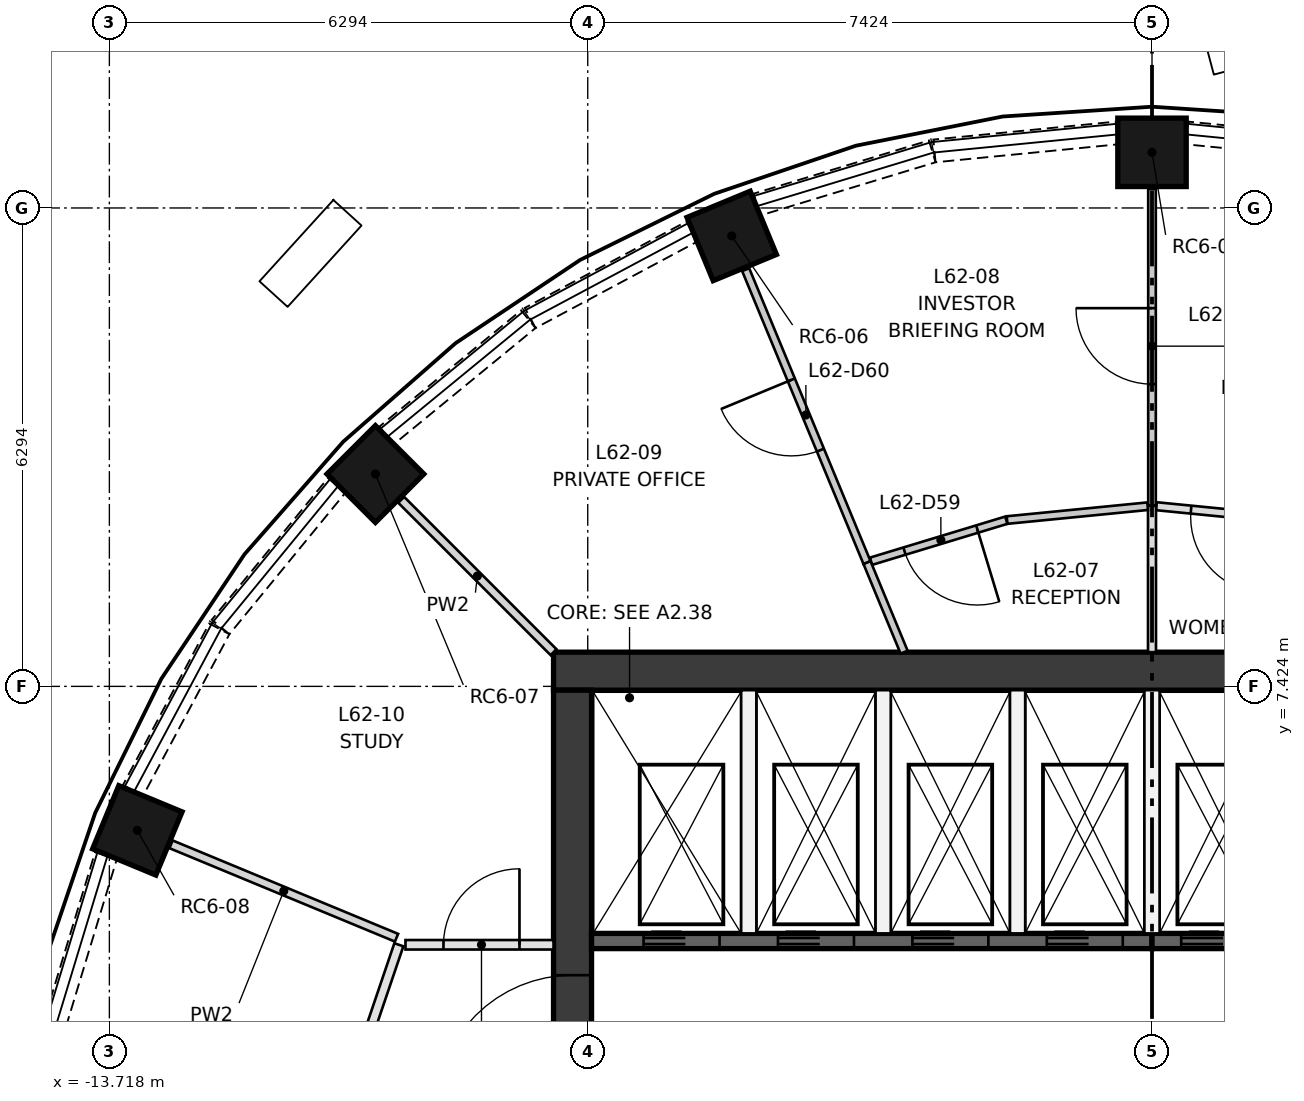
"""IFC4 building model, lengths in metres.
Left out: names, types, materials, properties, quantities, classifications, styles, units other than length and angle.
Written with IfcOpenShell. Run it as: python <this file> out.ifc"""

import sys

from ifc_helpers import new_model, si_unit, direction, frame, frame_2d, origin, origin_2d, place, context, subcontext, project, spatial, rectangle, extrude, element, fill, save


model = new_model("IFC4")
c1 = context("Model", 3, precision=1e-05, world=origin(), true_north=direction((0.0, 1.0)))
c2 = subcontext(c1, "Body", "Model", "MODEL_VIEW")
j1 = project(units=[si_unit("LENGTHUNIT", "METRE"), si_unit("PLANEANGLEUNIT", "RADIAN")], contexts=[c1])
p1 = place(None, origin())
s1 = spatial("IfcSite", under=j1, at=p1, CompositionType="ELEMENT")
p2 = place(p1, origin())
s2 = spatial("IfcBuilding", under=s1, at=p2, CompositionType="ELEMENT")
p3 = place(p2, frame((0.0, 0.0, 227.85)))
s3 = spatial("IfcBuildingStorey", under=s2, at=p3, CompositionType="ELEMENT", Elevation=227.85)
for number, where, z_axis, x_axis in (
    (1, (0.0, 14.45, 0.5), (0.0, 0.0, 1.0), (0.0, 1.0, 0.0)),
    (2, (-5.53, 13.35, 0.5), (0.0, 0.0, 1.0), (-0.383, 0.924, 0.0)),
    (3, (-10.218, 10.218, 0.5), (0.0, 0.0, 1.0), (-0.707, 0.707, 0.0)),
    (4, (-13.35, 5.53, 0.5), (0.0, 0.0, 1.0), (-0.924, 0.383, 0.0)),
):
    element("IfcColumn", number, at=place(p3, frame(where, z_axis=z_axis, x_axis=x_axis)), inside=s3, PredefinedType="COLUMN", context=c2, shape_type="SweptSolid", body=[
        extrude(rectangle(XDim=0.9, YDim=0.9, at=origin_2d()), origin(), (0.0, 0.0, 1.0), 2.35),
    ])
p4 = place(p3, frame((-7.874, 7.624, 0.0), z_axis=(0.0, 0.0, 1.0), x_axis=(1.0, 0.0, 0.0)))
e5 = element("IfcWall", 5, at=p4, inside=s3, PredefinedType="SHEAR", context=c2, shape_type="SweptSolid", body=[
    extrude(rectangle(XDim=15.748, YDim=0.5, at=frame_2d((7.874, 0.0))), origin(), (0.0, 0.0, 1.0), 3.35),
])
p5 = place(p3, frame((-7.624, -7.374, 0.0), z_axis=(0.0, 0.0, 1.0), x_axis=(0.0, 1.0, 0.0)))
e6 = element("IfcWall", 6, at=p5, inside=s3, PredefinedType="SHEAR", context=c2, shape_type="SweptSolid", body=[
    extrude(rectangle(XDim=14.748, YDim=0.5, at=frame_2d((7.374, 0.0))), origin(), (0.0, 0.0, 1.0), 3.35),
])
p6 = place(p5, frame((6.874, 0.0, 0.0)))
e7 = element("IfcOpeningElement", 7, at=p6, cuts=e6, PredefinedType="OPENING", context=c2, shape_type="SweptSolid", body=[
    extrude(rectangle(XDim=1.0, YDim=2.1, at=frame_2d((0.5, 1.05))), frame((0.0, 0.26, 0.0), z_axis=(0.0, -1.0, 0.0), x_axis=(1.0, 0.0, 0.0)), (0.0, 0.0, 1.0), 0.52),
])
p7 = place(p5, frame((3.75, 0.0, 0.0)))
e8 = element("IfcOpeningElement", 8, at=p7, cuts=e6, PredefinedType="OPENING", context=c2, shape_type="SweptSolid", body=[
    extrude(rectangle(XDim=1.8, YDim=2.1, at=frame_2d((0.9, 1.05))), frame((0.0, 0.26, 0.0), z_axis=(0.0, -1.0, 0.0), x_axis=(1.0, 0.0, 0.0)), (0.0, 0.0, 1.0), 0.52),
])
p8 = place(p5, frame((9.198, 0.0, 0.0)))
e9 = element("IfcOpeningElement", 9, at=p8, cuts=e6, PredefinedType="OPENING", context=c2, shape_type="SweptSolid", body=[
    extrude(rectangle(XDim=1.8, YDim=2.1, at=frame_2d((0.9, 1.05))), frame((0.0, 0.26, 0.0), z_axis=(0.0, -1.0, 0.0), x_axis=(1.0, 0.0, 0.0)), (0.0, 0.0, 1.0), 0.52),
])
p9 = place(p3, frame((-7.374, 4.074, 0.0), z_axis=(0.0, 0.0, 1.0), x_axis=(1.0, 0.0, 0.0)))
e10 = element("IfcWall", 10, at=p9, inside=s3, PredefinedType="SHEAR", context=c2, shape_type="SweptSolid", body=[
    extrude(rectangle(XDim=7.374, YDim=0.2, at=frame_2d((3.687, 0.0))), origin(), (0.0, 0.0, 1.0), 3.0),
])
p10 = place(p9, frame((0.684, 0.0, 0.0)))
e11 = element("IfcOpeningElement", 11, at=p10, cuts=e10, PredefinedType="OPENING", context=c2, shape_type="SweptSolid", body=[
    extrude(rectangle(XDim=1.0, YDim=2.1, at=frame_2d((0.5, 1.05))), frame((0.0, 0.11, 0.0), z_axis=(0.0, -1.0, 0.0), x_axis=(1.0, 0.0, 0.0)), (0.0, 0.0, 1.0), 0.22),
])
p11 = place(p9, frame((2.453, 0.0, 0.0)))
e12 = element("IfcOpeningElement", 12, at=p11, cuts=e10, PredefinedType="OPENING", context=c2, shape_type="SweptSolid", body=[
    extrude(rectangle(XDim=1.0, YDim=2.1, at=frame_2d((0.5, 1.05))), frame((0.0, 0.11, 0.0), z_axis=(0.0, -1.0, 0.0), x_axis=(1.0, 0.0, 0.0)), (0.0, 0.0, 1.0), 0.22),
])
p12 = place(p9, frame((4.221, 0.0, 0.0)))
e13 = element("IfcOpeningElement", 13, at=p12, cuts=e10, PredefinedType="OPENING", context=c2, shape_type="SweptSolid", body=[
    extrude(rectangle(XDim=1.0, YDim=2.1, at=frame_2d((0.5, 1.05))), frame((0.0, 0.11, 0.0), z_axis=(0.0, -1.0, 0.0), x_axis=(1.0, 0.0, 0.0)), (0.0, 0.0, 1.0), 0.22),
])
p13 = place(p9, frame((5.99, 0.0, 0.0)))
e14 = element("IfcOpeningElement", 14, at=p13, cuts=e10, PredefinedType="OPENING", context=c2, shape_type="SweptSolid", body=[
    extrude(rectangle(XDim=1.0, YDim=2.1, at=frame_2d((0.5, 1.05))), frame((0.0, 0.11, 0.0), z_axis=(0.0, -1.0, 0.0), x_axis=(1.0, 0.0, 0.0)), (0.0, 0.0, 1.0), 0.22),
])
p14 = place(p3, frame((0.0, 4.074, 0.0), z_axis=(0.0, 0.0, 1.0), x_axis=(1.0, 0.0, 0.0)))
e15 = element("IfcWall", 15, at=p14, inside=s3, PredefinedType="SHEAR", context=c2, shape_type="SweptSolid", body=[
    extrude(rectangle(XDim=7.374, YDim=0.2, at=frame_2d((3.687, 0.0))), origin(), (0.0, 0.0, 1.0), 3.0),
])
p15 = place(p14, frame((0.384, 0.0, 0.0)))
e16 = element("IfcOpeningElement", 16, at=p15, cuts=e15, PredefinedType="OPENING", context=c2, shape_type="SweptSolid", body=[
    extrude(rectangle(XDim=1.0, YDim=2.1, at=frame_2d((0.5, 1.05))), frame((0.0, 0.11, 0.0), z_axis=(0.0, -1.0, 0.0), x_axis=(1.0, 0.0, 0.0)), (0.0, 0.0, 1.0), 0.22),
])
p16 = place(p14, frame((2.153, 0.0, 0.0)))
e17 = element("IfcOpeningElement", 17, at=p16, cuts=e15, PredefinedType="OPENING", context=c2, shape_type="SweptSolid", body=[
    extrude(rectangle(XDim=1.0, YDim=2.1, at=frame_2d((0.5, 1.05))), frame((0.0, 0.11, 0.0), z_axis=(0.0, -1.0, 0.0), x_axis=(1.0, 0.0, 0.0)), (0.0, 0.0, 1.0), 0.22),
])
p17 = place(p14, frame((3.921, 0.0, 0.0)))
e18 = element("IfcOpeningElement", 18, at=p17, cuts=e15, PredefinedType="OPENING", context=c2, shape_type="SweptSolid", body=[
    extrude(rectangle(XDim=1.0, YDim=2.1, at=frame_2d((0.5, 1.05))), frame((0.0, 0.11, 0.0), z_axis=(0.0, -1.0, 0.0), x_axis=(1.0, 0.0, 0.0)), (0.0, 0.0, 1.0), 0.22),
])
p18 = place(p14, frame((5.79, 0.0, 0.0)))
e19 = element("IfcOpeningElement", 19, at=p18, cuts=e15, PredefinedType="OPENING", context=c2, shape_type="SweptSolid", body=[
    extrude(rectangle(XDim=0.8, YDim=2.1, at=frame_2d((0.4, 1.05))), frame((0.0, 0.11, 0.0), z_axis=(0.0, -1.0, 0.0), x_axis=(1.0, 0.0, 0.0)), (0.0, 0.0, 1.0), 0.22),
])
for number, where, z_axis, x_axis in (
    (20, (-5.305, 4.174, 0.0), (0.0, 0.0, 1.0), (0.0, 1.0, 0.0)),
    (21, (-3.537, 4.174, 0.0), (0.0, 0.0, 1.0), (0.0, 1.0, 0.0)),
    (22, (-1.769, 4.174, 0.0), (0.0, 0.0, 1.0), (0.0, 1.0, 0.0)),
    (23, (0.0, 4.174, 0.0), (0.0, 0.0, 1.0), (0.0, 1.0, 0.0)),
):
    element("IfcWall", number, at=place(p3, frame(where, z_axis=z_axis, x_axis=x_axis)), inside=s3, PredefinedType="PARTITIONING", context=c2, shape_type="SweptSolid", body=[
        extrude(rectangle(XDim=3.2, YDim=0.2, at=frame_2d((1.6, 0.0))), origin(), (0.0, 0.0, 1.0), 3.0),
    ])
for number, where, z_axis, x_axis in (
    (24, (2.862, 14.469, 0.0), (0.0, 0.0, 1.0), (-0.995, 0.098, 0.0)),
    (25, (-0.463, 14.705, 0.0), (0.0, 0.0, 1.0), (-0.995, -0.098, 0.0)),
):
    element("IfcWall", number, at=place(p3, frame(where, z_axis=z_axis, x_axis=x_axis)), inside=s3, PredefinedType="SOLIDWALL", context=c2, shape_type="SweptSolid", body=[
        extrude(rectangle(XDim=2.411, YDim=0.3, at=frame_2d((1.205, 0.0))), origin(), (0.0, 0.0, 1.0), 0.9),
    ])
p19 = place(p3, frame((-2.891, 14.463, 0.0), z_axis=(0.0, 0.0, 1.0), x_axis=(-0.956901683383, -0.290412066449, 0.0)))
e26 = element("IfcWall", 26, at=p19, inside=s3, PredefinedType="SOLIDWALL", context=c2, shape_type="SweptSolid", body=[
    extrude(rectangle(XDim=2.411, YDim=0.3, at=frame_2d((1.206, 0.0))), origin(), (0.0, 0.0, 1.0), 0.9),
])
p20 = place(p3, frame((-6.055, 13.407, 0.0), z_axis=(0.0, 0.0, 1.0), x_axis=(-0.881962886229, -0.471318859495, 0.0)))
e27 = element("IfcWall", 27, at=p20, inside=s3, PredefinedType="SOLIDWALL", context=c2, shape_type="SweptSolid", body=[
    extrude(rectangle(XDim=2.41, YDim=0.3, at=frame_2d((1.205, 0.0))), origin(), (0.0, 0.0, 1.0), 0.9),
])
for number, where, z_axis, x_axis in (
    (28, (-8.206, 12.254, 0.0), (0.0, 0.0, 1.0), (-0.773, -0.634, 0.0)),
    (29, (-10.726, 10.07, 0.0), (0.0, 0.0, 1.0), (-0.634, -0.773, 0.0)),
):
    element("IfcWall", number, at=place(p3, frame(where, z_axis=z_axis, x_axis=x_axis)), inside=s3, PredefinedType="SOLIDWALL", context=c2, shape_type="SweptSolid", body=[
        extrude(rectangle(XDim=2.411, YDim=0.3, at=frame_2d((1.206, 0.0))), origin(), (0.0, 0.0, 1.0), 0.9),
    ])
p21 = place(p3, frame((-12.271, 8.181, 0.0), z_axis=(0.0, 0.0, 1.0), x_axis=(-0.471318859495, -0.881962886229, 0.0)))
e30 = element("IfcWall", 30, at=p21, inside=s3, PredefinedType="SOLIDWALL", context=c2, shape_type="SweptSolid", body=[
    extrude(rectangle(XDim=2.41, YDim=0.3, at=frame_2d((1.205, 0.0))), origin(), (0.0, 0.0, 1.0), 0.9),
])
p22 = place(p3, frame((-13.762, 5.198, 0.0), z_axis=(0.0, 0.0, 1.0), x_axis=(-0.290412066449, -0.956901683383, 0.0)))
e31 = element("IfcWall", 31, at=p22, inside=s3, PredefinedType="SOLIDWALL", context=c2, shape_type="SweptSolid", body=[
    extrude(rectangle(XDim=2.411, YDim=0.3, at=frame_2d((1.206, 0.0))), origin(), (0.0, 0.0, 1.0), 0.9),
])
p23 = place(p3, frame((-9.822, 4.024, 0.0), z_axis=(0.0, 0.0, 1.0), x_axis=(1.0, 0.0, 0.0)))
e32 = element("IfcWall", 32, at=p23, inside=s3, PredefinedType="PARTITIONING", context=c2, shape_type="SweptSolid", body=[
    extrude(rectangle(XDim=1.948, YDim=0.125, at=frame_2d((0.974, 0.0))), origin(), (0.0, 0.0, 1.0), 3.0),
])
p24 = place(p23, frame((0.5, 0.0, 0.0)))
e33 = element("IfcOpeningElement", 33, at=p24, cuts=e32, PredefinedType="OPENING", context=c2, shape_type="SweptSolid", body=[
    extrude(rectangle(XDim=1.0, YDim=2.1, at=frame_2d((0.5, 1.05))), frame((0.0, 0.073, 0.0), z_axis=(0.0, -1.0, 0.0), x_axis=(1.0, 0.0, 0.0)), (0.0, 0.0, 1.0), 0.145),
])
p25 = place(p3, frame((-10.334, 2.773, 0.0), z_axis=(0.0, 0.0, 1.0), x_axis=(0.321488657109, 0.946913429702, 0.0)))
e34 = element("IfcWall", 34, at=p25, inside=s3, PredefinedType="PARTITIONING", context=c2, shape_type="SweptSolid", body=[
    extrude(rectangle(XDim=1.321, YDim=0.125, at=frame_2d((0.661, 0.0))), origin(), (0.0, 0.0, 1.0), 3.0),
])
p26 = place(p3, frame((1.907, 9.612, 0.0), z_axis=(0.0, 0.0, 1.0), x_axis=(-0.99519720103, 0.097890403323, 0.0)))
e35 = element("IfcWall", 35, at=p26, inside=s3, PredefinedType="PARTITIONING", context=c2, shape_type="SweptSolid", body=[
    extrude(rectangle(XDim=1.858, YDim=0.105, at=frame_2d((0.929, 0.0))), origin(), (0.0, 0.0, 1.0), 3.0),
])
p27 = place(p26, frame((0.4, 0.0, 0.0)))
e36 = element("IfcOpeningElement", 36, at=p27, cuts=e35, PredefinedType="OPENING", context=c2, shape_type="SweptSolid", body=[
    extrude(rectangle(XDim=1.0, YDim=2.1, at=frame_2d((0.5, 1.05))), frame((0.0, 0.062, 0.0), z_axis=(0.0, -1.0, 0.0), x_axis=(1.0, 0.0, 0.0)), (0.0, 0.0, 1.0), 0.125),
])
p28 = place(p3, frame((0.0, 7.874, 0.0), z_axis=(0.0, 0.0, 1.0), x_axis=(0.0, 1.0, 0.0)))
e37 = element("IfcWall", 37, at=p28, inside=s3, PredefinedType="PARTITIONING", context=c2, shape_type="SweptSolid", body=[
    extrude(rectangle(XDim=1.926, YDim=0.105, at=frame_2d((0.963, 0.0))), origin(), (0.0, 0.0, 1.0), 3.0),
])
p29 = place(p3, frame((0.0, 9.8, 0.0), z_axis=(0.0, 0.0, 1.0), x_axis=(0.0, 1.0, 0.0)))
e38 = element("IfcWall", 38, at=p29, inside=s3, PredefinedType="PARTITIONING", context=c2, shape_type="SweptSolid", body=[
    extrude(rectangle(XDim=4.17, YDim=0.1, at=frame_2d((2.085, 0.0))), origin(), (0.0, 0.0, 1.0), 3.0),
])
p30 = place(p29, frame((1.6, 0.0, 0.0)))
e39 = element("IfcOpeningElement", 39, at=p30, cuts=e38, PredefinedType="OPENING", context=c2, shape_type="SweptSolid", body=[
    extrude(rectangle(XDim=1.0, YDim=2.1, at=frame_2d((0.5, 1.05))), frame((0.0, 0.06, 0.0), z_axis=(0.0, -1.0, 0.0), x_axis=(1.0, 0.0, 0.0)), (0.0, 0.0, 1.0), 0.12),
])
p31 = place(p3, frame((-1.917, 9.61, 0.0), z_axis=(0.0, 0.0, 1.0), x_axis=(-0.956937203992, -0.290295001019, 0.0)))
e40 = element("IfcWall", 40, at=p31, inside=s3, PredefinedType="PARTITIONING", context=c2, shape_type="SweptSolid", body=[
    extrude(rectangle(XDim=1.861, YDim=0.1, at=frame_2d((0.931, 0.0))), origin(), (0.0, 0.0, 1.0), 3.0),
])
p32 = place(p31, frame((0.4, 0.0, 0.0)))
e41 = element("IfcOpeningElement", 41, at=p32, cuts=e40, PredefinedType="OPENING", context=c2, shape_type="SweptSolid", body=[
    extrude(rectangle(XDim=1.0, YDim=2.1, at=frame_2d((0.5, 1.05))), frame((0.0, 0.06, 0.0), z_axis=(0.0, -1.0, 0.0), x_axis=(1.0, 0.0, 0.0)), (0.0, 0.0, 1.0), 0.12),
])
p33 = place(p3, frame((-1.907, 9.612, 0.0), z_axis=(0.0, 0.0, 1.0), x_axis=(0.995199718264, 0.09786480862, 0.0)))
e42 = element("IfcWall", 42, at=p33, inside=s3, PredefinedType="PARTITIONING", context=c2, shape_type="SweptSolid", body=[
    extrude(rectangle(XDim=1.859, YDim=0.1, at=frame_2d((0.929, 0.0))), origin(), (0.0, 0.0, 1.0), 3.0),
])
p34 = place(p3, frame((-3.261, 7.874, 0.0), z_axis=(0.0, 0.0, 1.0), x_axis=(-0.382700703766, 0.923872378273, 0.0)))
e43 = element("IfcWall", 43, at=p34, inside=s3, PredefinedType="PARTITIONING", context=c2, shape_type="SweptSolid", body=[
    extrude(rectangle(XDim=1.277, YDim=0.1, at=frame_2d((0.639, 0.0))), origin(), (0.0, 0.0, 1.0), 3.0),
])
p35 = place(p3, frame((-3.75, 9.054, 0.0), z_axis=(0.0, 0.0, 1.0), x_axis=(-0.382718911932, 0.923864835595, 0.0)))
e44 = element("IfcWall", 44, at=p35, inside=s3, PredefinedType="PARTITIONING", context=c2, shape_type="SweptSolid", body=[
    extrude(rectangle(XDim=4.17, YDim=0.1, at=frame_2d((2.085, 0.0))), origin(), (0.0, 0.0, 1.0), 3.0),
])
p36 = place(p35, frame((1.6, 0.0, 0.0)))
e45 = element("IfcOpeningElement", 45, at=p36, cuts=e44, PredefinedType="OPENING", context=c2, shape_type="SweptSolid", body=[
    extrude(rectangle(XDim=1.0, YDim=2.1, at=frame_2d((0.5, 1.05))), frame((0.0, 0.06, 0.0), z_axis=(0.0, -1.0, 0.0), x_axis=(1.0, 0.0, 0.0)), (0.0, 0.0, 1.0), 0.12),
])
p37 = place(p3, frame((-7.874, 7.874, 0.0), z_axis=(0.0, 0.0, 1.0), x_axis=(-0.707106781187, 0.707106781187, 0.0)))
e46 = element("IfcWall", 46, at=p37, inside=s3, PredefinedType="PARTITIONING", context=c2, shape_type="SweptSolid", body=[
    extrude(rectangle(XDim=2.835, YDim=0.11, at=frame_2d((1.417, 0.0))), origin(), (0.0, 0.0, 1.0), 3.0),
])
p38 = place(p3, frame((-9.94, 4.117, 0.0), z_axis=(0.0, 0.0, 1.0), x_axis=(-0.923866716252, 0.382714372088, 0.0)))
e47 = element("IfcWall", 47, at=p38, inside=s3, PredefinedType="PARTITIONING", context=c2, shape_type="SweptSolid", body=[
    extrude(rectangle(XDim=3.211, YDim=0.11, at=frame_2d((1.605, 0.0))), origin(), (0.0, 0.0, 1.0), 3.0),
])
p39 = place(p10, frame((1.0, 0.0, 0.0), z_axis=(0.0, 0.0, 1.0), x_axis=(-1.0, 0.0, 0.0)))
e48 = element("IfcDoor", 48, at=p39, inside=s3, OperationType="DOUBLE_DOOR_SLIDING", PredefinedType="DOOR", context=c2, shape_type="SweptSolid", body=[
    extrude(rectangle(XDim=1.0, YDim=2.1, at=frame_2d((0.5, 1.05))), frame((0.0, 0.025, 0.0), z_axis=(0.0, -1.0, 0.0), x_axis=(1.0, 0.0, 0.0)), (0.0, 0.0, 1.0), 0.05),
])
fill(e11, e48)
p40 = place(p11, frame((1.0, 0.0, 0.0), z_axis=(0.0, 0.0, 1.0), x_axis=(-1.0, 0.0, 0.0)))
e49 = element("IfcDoor", 49, at=p40, inside=s3, OperationType="DOUBLE_DOOR_SLIDING", PredefinedType="DOOR", context=c2, shape_type="SweptSolid", body=[
    extrude(rectangle(XDim=1.0, YDim=2.1, at=frame_2d((0.5, 1.05))), frame((0.0, 0.025, 0.0), z_axis=(0.0, -1.0, 0.0), x_axis=(1.0, 0.0, 0.0)), (0.0, 0.0, 1.0), 0.05),
])
fill(e12, e49)
p41 = place(p12, frame((1.0, 0.0, 0.0), z_axis=(0.0, 0.0, 1.0), x_axis=(-1.0, 0.0, 0.0)))
e50 = element("IfcDoor", 50, at=p41, inside=s3, OperationType="DOUBLE_DOOR_SLIDING", PredefinedType="DOOR", context=c2, shape_type="SweptSolid", body=[
    extrude(rectangle(XDim=1.0, YDim=2.1, at=frame_2d((0.5, 1.05))), frame((0.0, 0.025, 0.0), z_axis=(0.0, -1.0, 0.0), x_axis=(1.0, 0.0, 0.0)), (0.0, 0.0, 1.0), 0.05),
])
fill(e13, e50)
p42 = place(p13, frame((1.0, 0.0, 0.0), z_axis=(0.0, 0.0, 1.0), x_axis=(-1.0, 0.0, 0.0)))
e51 = element("IfcDoor", 51, at=p42, inside=s3, OperationType="DOUBLE_DOOR_SLIDING", PredefinedType="DOOR", context=c2, shape_type="SweptSolid", body=[
    extrude(rectangle(XDim=1.0, YDim=2.1, at=frame_2d((0.5, 1.05))), frame((0.0, 0.025, 0.0), z_axis=(0.0, -1.0, 0.0), x_axis=(1.0, 0.0, 0.0)), (0.0, 0.0, 1.0), 0.05),
])
fill(e14, e51)
p43 = place(p15, frame((1.0, 0.0, 0.0), z_axis=(0.0, 0.0, 1.0), x_axis=(-1.0, 0.0, 0.0)))
e52 = element("IfcDoor", 52, at=p43, inside=s3, OperationType="DOUBLE_DOOR_SLIDING", PredefinedType="DOOR", context=c2, shape_type="SweptSolid", body=[
    extrude(rectangle(XDim=1.0, YDim=2.1, at=frame_2d((0.5, 1.05))), frame((0.0, 0.025, 0.0), z_axis=(0.0, -1.0, 0.0), x_axis=(1.0, 0.0, 0.0)), (0.0, 0.0, 1.0), 0.05),
])
fill(e16, e52)
p44 = place(p8, origin())
e53 = element("IfcDoor", 53, at=p44, inside=s3, OperationType="DOUBLE_DOOR_SINGLE_SWING", PredefinedType="DOOR", context=c2, shape_type="SweptSolid", body=[
    extrude(rectangle(XDim=1.8, YDim=2.1, at=frame_2d((0.9, 1.05))), frame((0.0, 0.025, 0.0), z_axis=(0.0, -1.0, 0.0), x_axis=(1.0, 0.0, 0.0)), (0.0, 0.0, 1.0), 0.05),
])
fill(e9, e53)
p45 = place(p24, origin())
e54 = element("IfcDoor", 54, at=p45, inside=s3, OperationType="SINGLE_SWING_RIGHT", PredefinedType="DOOR", context=c2, shape_type="SweptSolid", body=[
    extrude(rectangle(XDim=1.0, YDim=2.1, at=frame_2d((0.5, 1.05))), frame((0.0, 0.025, 0.0), z_axis=(0.0, -1.0, 0.0), x_axis=(1.0, 0.0, 0.0)), (0.0, 0.0, 1.0), 0.05),
])
fill(e33, e54)
p46 = place(p27, origin())
e55 = element("IfcDoor", 55, at=p46, inside=s3, OperationType="SINGLE_SWING_LEFT", PredefinedType="DOOR", context=c2, shape_type="SweptSolid", body=[
    extrude(rectangle(XDim=1.0, YDim=2.1, at=frame_2d((0.5, 1.05))), frame((0.0, 0.025, 0.0), z_axis=(0.0, -1.0, 0.0), x_axis=(1.0, 0.0, 0.0)), (0.0, 0.0, 1.0), 0.05),
])
fill(e36, e55)
p47 = place(p30, origin())
e56 = element("IfcDoor", 56, at=p47, inside=s3, OperationType="SINGLE_SWING_RIGHT", PredefinedType="DOOR", context=c2, shape_type="SweptSolid", body=[
    extrude(rectangle(XDim=1.0, YDim=2.1, at=frame_2d((0.5, 1.05))), frame((0.0, 0.025, 0.0), z_axis=(0.0, -1.0, 0.0), x_axis=(1.0, 0.0, 0.0)), (0.0, 0.0, 1.0), 0.05),
])
fill(e39, e56)
p48 = place(p32, origin())
e57 = element("IfcDoor", 57, at=p48, inside=s3, OperationType="SINGLE_SWING_LEFT", PredefinedType="DOOR", context=c2, shape_type="SweptSolid", body=[
    extrude(rectangle(XDim=1.0, YDim=2.1, at=frame_2d((0.5, 1.05))), frame((0.0, 0.025, 0.0), z_axis=(0.0, -1.0, 0.0), x_axis=(1.0, 0.0, 0.0)), (0.0, 0.0, 1.0), 0.05),
])
fill(e41, e57)
p49 = place(p36, origin())
e58 = element("IfcDoor", 58, at=p49, inside=s3, OperationType="SINGLE_SWING_RIGHT", PredefinedType="DOOR", context=c2, shape_type="SweptSolid", body=[
    extrude(rectangle(XDim=1.0, YDim=2.1, at=frame_2d((0.5, 1.05))), frame((0.0, 0.025, 0.0), z_axis=(0.0, -1.0, 0.0), x_axis=(1.0, 0.0, 0.0)), (0.0, 0.0, 1.0), 0.05),
])
fill(e45, e58)
save(model, sys.argv[1])
